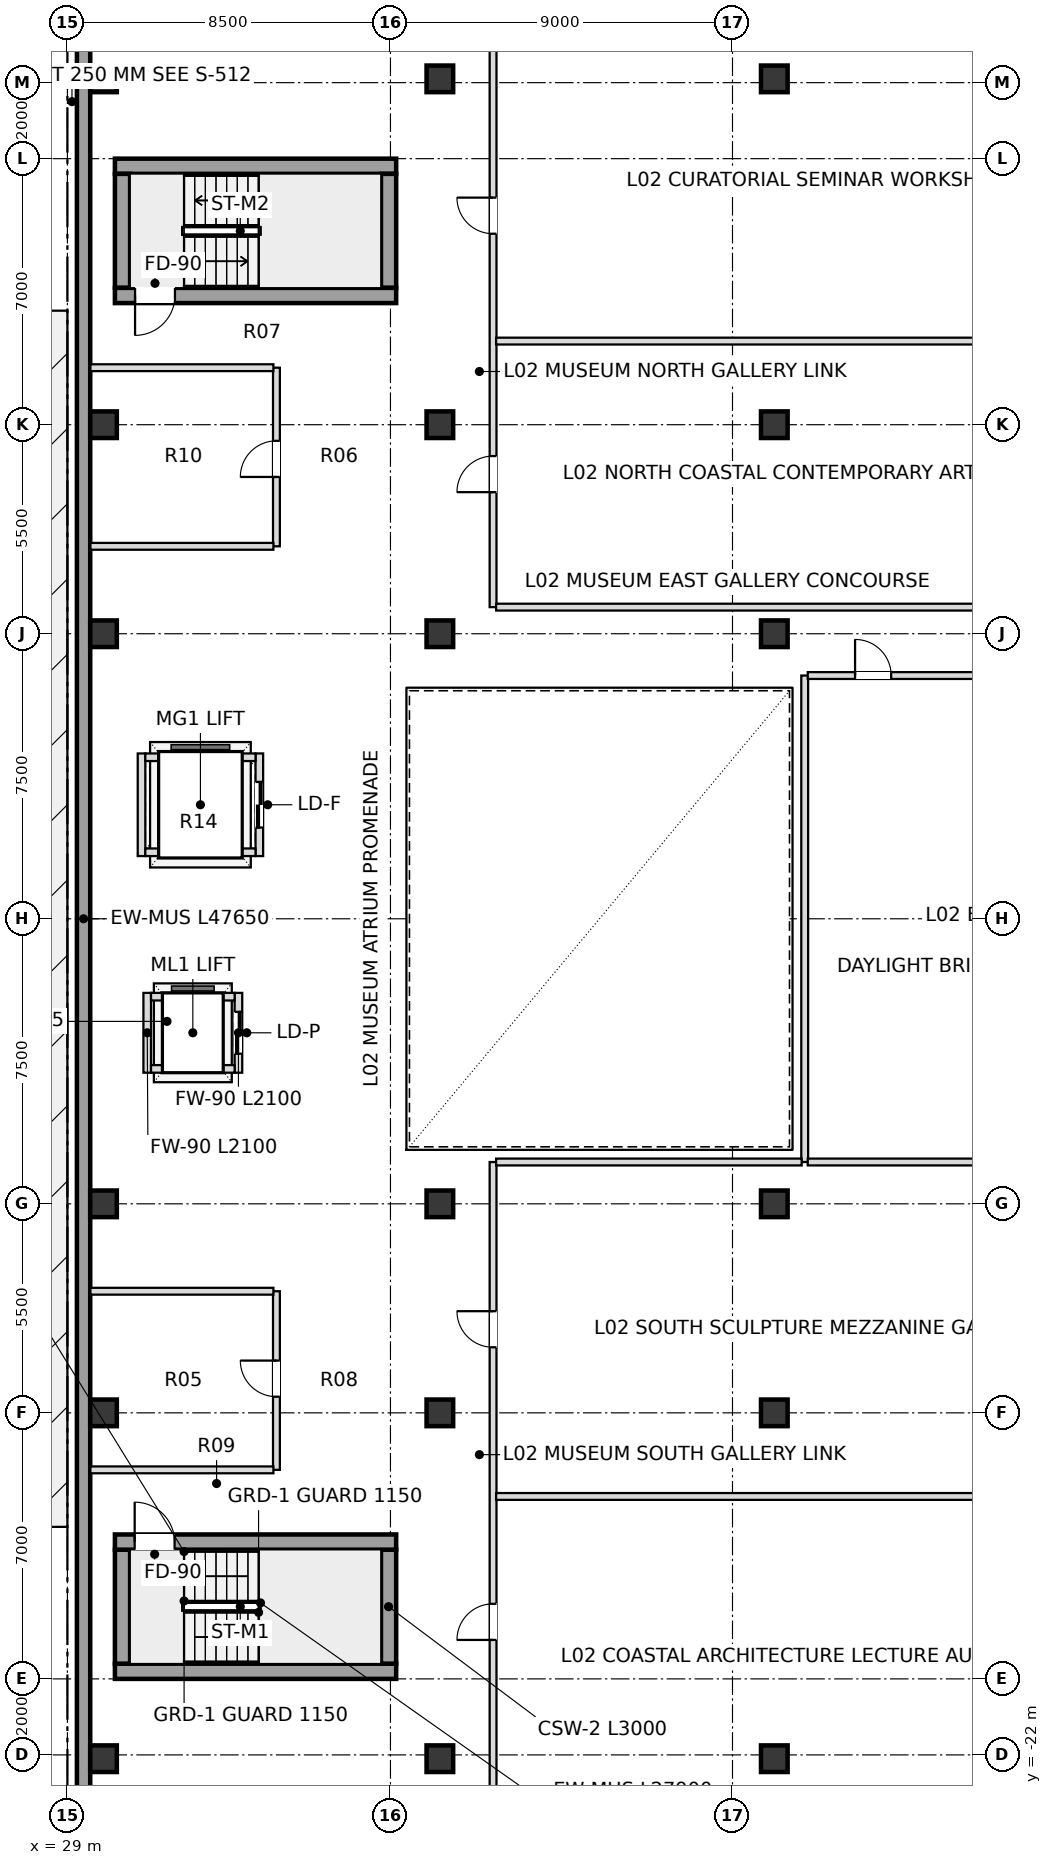
"""IFC4 building model, lengths in metres.
Left out: names, types, materials, properties, quantities, classifications, styles, units other than length and angle.
Written with IfcOpenShell. Run it as: python <this file> out.ifc"""

import sys

from ifc_helpers import new_model, si_unit, direction, frame, frame_2d, origin, origin_2d, place, context, subcontext, project, spatial, rectangle, extrude, element, fill, save


model = new_model("IFC4")
c1 = context("Model", 3, precision=1e-05, world=origin(), true_north=direction((0.0, 1.0)))
c2 = subcontext(c1, "Body", "Model", "MODEL_VIEW")
j1 = project(units=[si_unit("LENGTHUNIT", "METRE"), si_unit("PLANEANGLEUNIT", "RADIAN")], contexts=[c1])
p1 = place(None, origin())
s1 = spatial("IfcSite", under=j1, at=p1, CompositionType="ELEMENT")
p2 = place(p1, origin())
s2 = spatial("IfcBuilding", under=s1, at=p2, CompositionType="ELEMENT")
p3 = place(p2, frame((0.0, 0.0, 11.4)))
s3 = spatial("IfcBuildingStorey", under=s2, at=p3, CompositionType="ELEMENT", Elevation=11.4)
for number, where, z_axis, x_axis in (
    (1, (29.95, -22.1, 0.0), (0.0, 0.0, 1.0), (1.0, 0.0, 0.0)),
    (2, (29.95, -13.0, 0.0), (0.0, 0.0, 1.0), (1.0, 0.0, 0.0)),
    (3, (29.95, -7.5, 0.0), (0.0, 0.0, 1.0), (1.0, 0.0, 0.0)),
    (4, (29.95, 7.5, 0.0), (0.0, 0.0, 1.0), (1.0, 0.0, 0.0)),
    (5, (29.95, 13.0, 0.0), (0.0, 0.0, 1.0), (1.0, 0.0, 0.0)),
    (6, (29.95, 22.1, 0.0), (0.0, 0.0, 1.0), (1.0, 0.0, 0.0)),
    (7, (38.8, -22.1, 0.0), (0.0, 0.0, 1.0), (1.0, 0.0, 0.0)),
    (8, (38.8, -13.0, 0.0), (0.0, 0.0, 1.0), (1.0, 0.0, 0.0)),
    (9, (38.8, -7.5, 0.0), (0.0, 0.0, 1.0), (1.0, 0.0, 0.0)),
    (10, (38.8, 7.5, 0.0), (0.0, 0.0, 1.0), (1.0, 0.0, 0.0)),
    (11, (38.8, 13.0, 0.0), (0.0, 0.0, 1.0), (1.0, 0.0, 0.0)),
    (12, (38.8, 22.1, 0.0), (0.0, 0.0, 1.0), (1.0, 0.0, 0.0)),
    (13, (47.6, -22.1, 0.0), (0.0, 0.0, 1.0), (1.0, 0.0, 0.0)),
    (14, (47.6, -13.0, 0.0), (0.0, 0.0, 1.0), (1.0, 0.0, 0.0)),
    (15, (47.6, -7.5, 0.0), (0.0, 0.0, 1.0), (1.0, 0.0, 0.0)),
    (16, (47.6, 7.5, 0.0), (0.0, 0.0, 1.0), (1.0, 0.0, 0.0)),
    (17, (47.6, 13.0, 0.0), (0.0, 0.0, 1.0), (1.0, 0.0, 0.0)),
    (18, (47.6, 22.1, 0.0), (0.0, 0.0, 1.0), (1.0, 0.0, 0.0)),
):
    element("IfcColumn", number, at=place(p3, frame(where, z_axis=z_axis, x_axis=x_axis)), inside=s3, PredefinedType="COLUMN", context=c2, shape_type="SweptSolid", body=[
        extrude(rectangle(XDim=0.7, YDim=0.7, at=origin_2d()), origin(), (0.0, 0.0, 1.0), 5.4),
    ])
p4 = place(p3, frame((29.425, 23.825, 0.0), z_axis=(0.0, 0.0, 1.0), x_axis=(0.0, -1.0, 0.0)))
e19 = element("IfcWall", 19, at=p4, inside=s3, PredefinedType="SOLIDWALL", context=c2, shape_type="SweptSolid", body=[
    extrude(rectangle(XDim=47.65, YDim=0.35, at=frame_2d((23.825, 0.0))), origin(), (0.0, 0.0, 1.0), 5.08),
])
p5 = place(p3, frame((37.65, -19.8, 0.0), z_axis=(0.0, 0.0, 1.0), x_axis=(-1.0, 0.0, 0.0)))
e20 = element("IfcWall", 20, at=p5, inside=s3, PredefinedType="SHEAR", context=c2, shape_type="SweptSolid", body=[
    extrude(rectangle(XDim=7.4, YDim=0.4, at=frame_2d((3.7, 0.0))), origin(), (0.0, 0.0, 1.0), 5.08),
])
for number, where, z_axis, x_axis in (
    (21, (37.45, -19.6, 0.0), (0.0, 0.0, 1.0), (0.0, 1.0, 0.0)),
    (22, (30.45, -19.6, 0.0), (0.0, 0.0, 1.0), (0.0, 1.0, 0.0)),
):
    element("IfcWall", number, at=place(p3, frame(where, z_axis=z_axis, x_axis=x_axis)), inside=s3, PredefinedType="SHEAR", context=c2, shape_type="SweptSolid", body=[
        extrude(rectangle(XDim=3.0, YDim=0.4, at=frame_2d((1.5, 0.0))), origin(), (0.0, 0.0, 1.0), 5.08),
    ])
p6 = place(p3, frame((30.25, -16.4, 0.0), z_axis=(0.0, 0.0, 1.0), x_axis=(1.0, 0.0, 0.0)))
e23 = element("IfcWall", 23, at=p6, inside=s3, PredefinedType="SHEAR", context=c2, shape_type="SweptSolid", body=[
    extrude(rectangle(XDim=7.4, YDim=0.4, at=frame_2d((3.7, 0.0))), origin(), (0.0, 0.0, 1.0), 5.08),
])
p7 = place(p6, frame((0.52, 0.0, 0.0)))
e24 = element("IfcOpeningElement", 24, at=p7, cuts=e23, PredefinedType="OPENING", context=c2, shape_type="SweptSolid", body=[
    extrude(rectangle(XDim=1.05, YDim=2.15, at=frame_2d((0.525, 1.075))), frame((0.0, 0.21, 0.0), z_axis=(0.0, -1.0, 0.0), x_axis=(1.0, 0.0, 0.0)), (0.0, 0.0, 1.0), 0.42),
])
p8 = place(p3, frame((30.25, 19.8, 0.0), z_axis=(0.0, 0.0, 1.0), x_axis=(1.0, 0.0, 0.0)))
e25 = element("IfcWall", 25, at=p8, inside=s3, PredefinedType="SHEAR", context=c2, shape_type="SweptSolid", body=[
    extrude(rectangle(XDim=7.4, YDim=0.4, at=frame_2d((3.7, 0.0))), origin(), (0.0, 0.0, 1.0), 5.08),
])
for number, where, z_axis, x_axis in (
    (26, (37.45, 16.6, 0.0), (0.0, 0.0, 1.0), (0.0, 1.0, 0.0)),
    (27, (30.45, 16.6, 0.0), (0.0, 0.0, 1.0), (0.0, 1.0, 0.0)),
):
    element("IfcWall", number, at=place(p3, frame(where, z_axis=z_axis, x_axis=x_axis)), inside=s3, PredefinedType="SHEAR", context=c2, shape_type="SweptSolid", body=[
        extrude(rectangle(XDim=3.0, YDim=0.4, at=frame_2d((1.5, 0.0))), origin(), (0.0, 0.0, 1.0), 5.08),
    ])
p9 = place(p3, frame((37.65, 16.4, 0.0), z_axis=(0.0, 0.0, 1.0), x_axis=(-1.0, 0.0, 0.0)))
e28 = element("IfcWall", 28, at=p9, inside=s3, PredefinedType="SHEAR", context=c2, shape_type="SweptSolid", body=[
    extrude(rectangle(XDim=7.4, YDim=0.4, at=frame_2d((3.7, 0.0))), origin(), (0.0, 0.0, 1.0), 5.08),
])
p10 = place(p9, frame((5.82, 0.0, 0.0)))
e29 = element("IfcOpeningElement", 29, at=p10, cuts=e28, PredefinedType="OPENING", context=c2, shape_type="SweptSolid", body=[
    extrude(rectangle(XDim=1.05, YDim=2.15, at=frame_2d((0.525, 1.075))), frame((0.0, 0.21, 0.0), z_axis=(0.0, -1.0, 0.0), x_axis=(1.0, 0.0, 0.0)), (0.0, 0.0, 1.0), 0.42),
])
p11 = place(p3, frame((33.5, -4.05, 0.0), z_axis=(0.0, 0.0, 1.0), x_axis=(0.0, 1.0, 0.0)))
e30 = element("IfcWall", 30, at=p11, inside=s3, PredefinedType="SOLIDWALL", context=c2, shape_type="SweptSolid", body=[
    extrude(rectangle(XDim=2.1, YDim=0.2, at=frame_2d((1.05, 0.0))), origin(), (0.0, 0.0, 1.0), 4.297),
])
p12 = place(p11, frame((0.5, 0.0, 0.0)))
e31 = element("IfcOpeningElement", 31, at=p12, cuts=e30, PredefinedType="OPENING", context=c2, shape_type="SweptSolid", body=[
    extrude(rectangle(XDim=1.1, YDim=2.15, at=frame_2d((0.55, 1.075))), frame((0.0, 0.11, 0.0), z_axis=(0.0, -1.0, 0.0), x_axis=(1.0, 0.0, 0.0)), (0.0, 0.0, 1.0), 0.22),
])
p13 = place(p3, frame((31.1, -4.05, 0.0), z_axis=(0.0, 0.0, 1.0), x_axis=(0.0, 1.0, 0.0)))
e32 = element("IfcWall", 32, at=p13, inside=s3, PredefinedType="SOLIDWALL", context=c2, shape_type="SweptSolid", body=[
    extrude(rectangle(XDim=2.1, YDim=0.2, at=frame_2d((1.05, 0.0))), origin(), (0.0, 0.0, 1.0), 4.297),
])
for number, where, z_axis, x_axis in (
    (33, (31.2, -3.95, 0.0), (0.0, 0.0, 1.0), (1.0, 0.0, 0.0)),
    (34, (31.2, -2.05, 0.0), (0.0, 0.0, 1.0), (1.0, 0.0, 0.0)),
):
    element("IfcWall", number, at=place(p3, frame(where, z_axis=z_axis, x_axis=x_axis)), inside=s3, PredefinedType="SOLIDWALL", context=c2, shape_type="SweptSolid", body=[
        extrude(rectangle(XDim=2.2, YDim=0.2, at=frame_2d((1.1, 0.0))), origin(), (0.0, 0.0, 1.0), 4.297),
    ])
p14 = place(p3, frame((34.05, 1.65, 0.0), z_axis=(0.0, 0.0, 1.0), x_axis=(0.0, 1.0, 0.0)))
e35 = element("IfcWall", 35, at=p14, inside=s3, PredefinedType="SOLIDWALL", context=c2, shape_type="SweptSolid", body=[
    extrude(rectangle(XDim=2.7, YDim=0.2, at=frame_2d((1.35, 0.0))), origin(), (0.0, 0.0, 1.0), 4.297),
])
p15 = place(p14, frame((0.75, 0.0, 0.0)))
e36 = element("IfcOpeningElement", 36, at=p15, cuts=e35, PredefinedType="OPENING", context=c2, shape_type="SweptSolid", body=[
    extrude(rectangle(XDim=1.2, YDim=2.2, at=frame_2d((0.6, 1.1))), frame((0.0, 0.11, 0.0), z_axis=(0.0, -1.0, 0.0), x_axis=(1.0, 0.0, 0.0)), (0.0, 0.0, 1.0), 0.22),
])
p16 = place(p3, frame((30.95, 1.65, 0.0), z_axis=(0.0, 0.0, 1.0), x_axis=(0.0, 1.0, 0.0)))
e37 = element("IfcWall", 37, at=p16, inside=s3, PredefinedType="SOLIDWALL", context=c2, shape_type="SweptSolid", body=[
    extrude(rectangle(XDim=2.7, YDim=0.2, at=frame_2d((1.35, 0.0))), origin(), (0.0, 0.0, 1.0), 4.297),
])
for number, where, z_axis, x_axis in (
    (38, (31.05, 1.75, 0.0), (0.0, 0.0, 1.0), (1.0, 0.0, 0.0)),
    (39, (31.05, 4.25, 0.0), (0.0, 0.0, 1.0), (1.0, 0.0, 0.0)),
):
    element("IfcWall", number, at=place(p3, frame(where, z_axis=z_axis, x_axis=x_axis)), inside=s3, PredefinedType="SOLIDWALL", context=c2, shape_type="SweptSolid", body=[
        extrude(rectangle(XDim=2.9, YDim=0.2, at=frame_2d((1.45, 0.0))), origin(), (0.0, 0.0, 1.0), 4.297),
    ])
p17 = place(p3, frame((34.5, -14.5, 0.0), z_axis=(0.0, 0.0, 1.0), x_axis=(0.0, 1.0, 0.0)))
e40 = element("IfcWall", 40, at=p17, inside=s3, PredefinedType="PARTITIONING", context=c2, shape_type="SweptSolid", body=[
    extrude(rectangle(XDim=4.7, YDim=0.18, at=frame_2d((2.35, 0.0))), origin(), (0.0, 0.0, 1.0), 4.297),
])
p18 = place(p17, frame((1.925, 0.0, 0.0)))
e41 = element("IfcOpeningElement", 41, at=p18, cuts=e40, PredefinedType="OPENING", context=c2, shape_type="SweptSolid", body=[
    extrude(rectangle(XDim=0.95, YDim=2.15, at=frame_2d((0.475, 1.075))), frame((0.0, 0.1, 0.0), z_axis=(0.0, -1.0, 0.0), x_axis=(1.0, 0.0, 0.0)), (0.0, 0.0, 1.0), 0.2),
])
p19 = place(p3, frame((34.5, 9.8, 0.0), z_axis=(0.0, 0.0, 1.0), x_axis=(0.0, 1.0, 0.0)))
e42 = element("IfcWall", 42, at=p19, inside=s3, PredefinedType="PARTITIONING", context=c2, shape_type="SweptSolid", body=[
    extrude(rectangle(XDim=4.7, YDim=0.18, at=frame_2d((2.35, 0.0))), origin(), (0.0, 0.0, 1.0), 4.297),
])
p20 = place(p19, frame((1.825, 0.0, 0.0)))
e43 = element("IfcOpeningElement", 43, at=p20, cuts=e42, PredefinedType="OPENING", context=c2, shape_type="SweptSolid", body=[
    extrude(rectangle(XDim=0.95, YDim=2.15, at=frame_2d((0.475, 1.075))), frame((0.0, 0.1, 0.0), z_axis=(0.0, -1.0, 0.0), x_axis=(1.0, 0.0, 0.0)), (0.0, 0.0, 1.0), 0.2),
])
p21 = place(p3, frame((40.2, -23.645, 0.0), z_axis=(0.0, 0.0, 1.0), x_axis=(0.0, 1.0, 0.0)))
e44 = element("IfcWall", 44, at=p21, inside=s3, PredefinedType="PARTITIONING", context=c2, shape_type="SweptSolid", body=[
    extrude(rectangle(XDim=17.245, YDim=0.18, at=frame_2d((8.623, 0.0))), origin(), (0.0, 0.0, 1.0), 4.297),
])
p22 = place(p21, frame((4.67, 0.0, 0.0)))
e45 = element("IfcOpeningElement", 45, at=p22, cuts=e44, PredefinedType="OPENING", context=c2, shape_type="SweptSolid", body=[
    extrude(rectangle(XDim=0.95, YDim=2.15, at=frame_2d((0.475, 1.075))), frame((0.0, 0.1, 0.0), z_axis=(0.0, -1.0, 0.0), x_axis=(1.0, 0.0, 0.0)), (0.0, 0.0, 1.0), 0.2),
])
p23 = place(p21, frame((12.37, 0.0, 0.0)))
e46 = element("IfcOpeningElement", 46, at=p23, cuts=e44, PredefinedType="OPENING", context=c2, shape_type="SweptSolid", body=[
    extrude(rectangle(XDim=0.95, YDim=2.15, at=frame_2d((0.475, 1.075))), frame((0.0, 0.1, 0.0), z_axis=(0.0, -1.0, 0.0), x_axis=(1.0, 0.0, 0.0)), (0.0, 0.0, 1.0), 0.2),
])
p24 = place(p3, frame((40.2, 8.2, 0.0), z_axis=(0.0, 0.0, 1.0), x_axis=(0.0, 1.0, 0.0)))
e47 = element("IfcWall", 47, at=p24, inside=s3, PredefinedType="PARTITIONING", context=c2, shape_type="SweptSolid", body=[
    extrude(rectangle(XDim=15.52, YDim=0.18, at=frame_2d((7.76, 0.0))), origin(), (0.0, 0.0, 1.0), 4.297),
])
p25 = place(p24, frame((3.025, 0.0, 0.0)))
e48 = element("IfcOpeningElement", 48, at=p25, cuts=e47, PredefinedType="OPENING", context=c2, shape_type="SweptSolid", body=[
    extrude(rectangle(XDim=0.95, YDim=2.15, at=frame_2d((0.475, 1.075))), frame((0.0, 0.1, 0.0), z_axis=(0.0, -1.0, 0.0), x_axis=(1.0, 0.0, 0.0)), (0.0, 0.0, 1.0), 0.2),
])
p26 = place(p24, frame((9.825, 0.0, 0.0)))
e49 = element("IfcOpeningElement", 49, at=p26, cuts=e47, PredefinedType="OPENING", context=c2, shape_type="SweptSolid", body=[
    extrude(rectangle(XDim=0.95, YDim=2.15, at=frame_2d((0.475, 1.075))), frame((0.0, 0.1, 0.0), z_axis=(0.0, -1.0, 0.0), x_axis=(1.0, 0.0, 0.0)), (0.0, 0.0, 1.0), 0.2),
])
p27 = place(p3, frame((48.4, -6.4, 0.0), z_axis=(0.0, 0.0, 1.0), x_axis=(0.0, 1.0, 0.0)))
e50 = element("IfcWall", 50, at=p27, inside=s3, PredefinedType="PARTITIONING", context=c2, shape_type="SweptSolid", body=[
    extrude(rectangle(XDim=12.8, YDim=0.18, at=frame_2d((6.4, 0.0))), origin(), (0.0, 0.0, 1.0), 5.08),
])
p28 = place(p3, frame((40.28, -15.2, 0.0), z_axis=(0.0, 0.0, 1.0), x_axis=(1.0, 0.0, 0.0)))
e51 = element("IfcWall", 51, at=p28, inside=s3, PredefinedType="PARTITIONING", context=c2, shape_type="SweptSolid", body=[
    extrude(rectangle(XDim=16.865, YDim=0.18, at=frame_2d((8.433, 0.0))), origin(), (0.0, 0.0, 1.0), 4.214),
])
p29 = place(p3, frame((29.605, -14.5, 0.0), z_axis=(0.0, 0.0, 1.0), x_axis=(1.0, 0.0, 0.0)))
e52 = element("IfcWall", 52, at=p29, inside=s3, PredefinedType="PARTITIONING", context=c2, shape_type="SweptSolid", body=[
    extrude(rectangle(XDim=4.815, YDim=0.18, at=frame_2d((2.407, 0.0))), origin(), (0.0, 0.0, 1.0), 4.214),
])
p30 = place(p3, frame((29.605, -9.8, 0.0), z_axis=(0.0, 0.0, 1.0), x_axis=(1.0, 0.0, 0.0)))
e53 = element("IfcWall", 53, at=p30, inside=s3, PredefinedType="PARTITIONING", context=c2, shape_type="SweptSolid", body=[
    extrude(rectangle(XDim=4.815, YDim=0.18, at=frame_2d((2.407, 0.0))), origin(), (0.0, 0.0, 1.0), 4.297),
])
p31 = place(p3, frame((40.28, -6.4, 0.0), z_axis=(0.0, 0.0, 1.0), x_axis=(1.0, 0.0, 0.0)))
e54 = element("IfcWall", 54, at=p31, inside=s3, PredefinedType="PARTITIONING", context=c2, shape_type="SweptSolid", body=[
    extrude(rectangle(XDim=8.04, YDim=0.18, at=frame_2d((4.02, 0.0))), origin(), (0.0, 0.0, 1.0), 4.297),
])
p32 = place(p3, frame((48.48, -6.4, 0.0), z_axis=(0.0, 0.0, 1.0), x_axis=(1.0, 0.0, 0.0)))
e55 = element("IfcWall", 55, at=p32, inside=s3, PredefinedType="PARTITIONING", context=c2, shape_type="SweptSolid", body=[
    extrude(rectangle(XDim=8.665, YDim=0.18, at=frame_2d((4.333, 0.0))), origin(), (0.0, 0.0, 1.0), 4.297),
])
p33 = place(p3, frame((48.48, 6.4, 0.0), z_axis=(0.0, 0.0, 1.0), x_axis=(1.0, 0.0, 0.0)))
e56 = element("IfcWall", 56, at=p33, inside=s3, PredefinedType="PARTITIONING", context=c2, shape_type="SweptSolid", body=[
    extrude(rectangle(XDim=8.665, YDim=0.18, at=frame_2d((4.333, 0.0))), origin(), (0.0, 0.0, 1.0), 4.297),
])
p34 = place(p33, frame((1.245, 0.0, 0.0)))
e57 = element("IfcOpeningElement", 57, at=p34, cuts=e56, PredefinedType="OPENING", context=c2, shape_type="SweptSolid", body=[
    extrude(rectangle(XDim=0.95, YDim=2.15, at=frame_2d((0.475, 1.075))), frame((0.0, 0.1, 0.0), z_axis=(0.0, -1.0, 0.0), x_axis=(1.0, 0.0, 0.0)), (0.0, 0.0, 1.0), 0.2),
])
p35 = place(p3, frame((40.28, 8.2, 0.0), z_axis=(0.0, 0.0, 1.0), x_axis=(1.0, 0.0, 0.0)))
e58 = element("IfcWall", 58, at=p35, inside=s3, PredefinedType="PARTITIONING", context=c2, shape_type="SweptSolid", body=[
    extrude(rectangle(XDim=16.865, YDim=0.18, at=frame_2d((8.433, 0.0))), origin(), (0.0, 0.0, 1.0), 4.297),
])
for number, where, z_axis, x_axis in (
    (59, (29.605, 9.8, 0.0), (0.0, 0.0, 1.0), (1.0, 0.0, 0.0)),
    (60, (29.605, 14.5, 0.0), (0.0, 0.0, 1.0), (1.0, 0.0, 0.0)),
):
    element("IfcWall", number, at=place(p3, frame(where, z_axis=z_axis, x_axis=x_axis)), inside=s3, PredefinedType="PARTITIONING", context=c2, shape_type="SweptSolid", body=[
        extrude(rectangle(XDim=4.815, YDim=0.18, at=frame_2d((2.407, 0.0))), origin(), (0.0, 0.0, 1.0), 4.297),
    ])
p36 = place(p3, frame((40.28, 15.2, 0.0), z_axis=(0.0, 0.0, 1.0), x_axis=(1.0, 0.0, 0.0)))
e61 = element("IfcWall", 61, at=p36, inside=s3, PredefinedType="PARTITIONING", context=c2, shape_type="SweptSolid", body=[
    extrude(rectangle(XDim=16.865, YDim=0.18, at=frame_2d((8.433, 0.0))), origin(), (0.0, 0.0, 1.0), 4.297),
])
p37 = place(p7, origin())
e62 = element("IfcDoor", 62, at=p37, inside=s3, OperationType="SINGLE_SWING_LEFT", PredefinedType="DOOR", context=c2, shape_type="SweptSolid", body=[
    extrude(rectangle(XDim=1.05, YDim=2.15, at=frame_2d((0.525, 1.075))), frame((0.0, 0.025, 0.0), z_axis=(0.0, -1.0, 0.0), x_axis=(1.0, 0.0, 0.0)), (0.0, 0.0, 1.0), 0.05),
])
fill(e24, e62)
p38 = place(p10, origin())
e63 = element("IfcDoor", 63, at=p38, inside=s3, OperationType="SINGLE_SWING_RIGHT", PredefinedType="DOOR", context=c2, shape_type="SweptSolid", body=[
    extrude(rectangle(XDim=1.05, YDim=2.15, at=frame_2d((0.525, 1.075))), frame((0.0, 0.025, 0.0), z_axis=(0.0, -1.0, 0.0), x_axis=(1.0, 0.0, 0.0)), (0.0, 0.0, 1.0), 0.05),
])
fill(e29, e63)
p39 = place(p12, origin())
e64 = element("IfcDoor", 64, at=p39, inside=s3, OperationType="DOUBLE_DOOR_SLIDING", PredefinedType="DOOR", context=c2, shape_type="SweptSolid", body=[
    extrude(rectangle(XDim=1.1, YDim=2.15, at=frame_2d((0.55, 1.075))), frame((0.0, 0.025, 0.0), z_axis=(0.0, -1.0, 0.0), x_axis=(1.0, 0.0, 0.0)), (0.0, 0.0, 1.0), 0.05),
])
fill(e31, e64)
p40 = place(p15, origin())
e65 = element("IfcDoor", 65, at=p40, inside=s3, OperationType="DOUBLE_DOOR_SLIDING", PredefinedType="DOOR", context=c2, shape_type="SweptSolid", body=[
    extrude(rectangle(XDim=1.2, YDim=2.2, at=frame_2d((0.6, 1.1))), frame((0.0, 0.025, 0.0), z_axis=(0.0, -1.0, 0.0), x_axis=(1.0, 0.0, 0.0)), (0.0, 0.0, 1.0), 0.05),
])
fill(e36, e65)
p41 = place(p25, origin())
e66 = element("IfcDoor", 66, at=p41, inside=s3, OperationType="SINGLE_SWING_LEFT", PredefinedType="DOOR", context=c2, shape_type="SweptSolid", body=[
    extrude(rectangle(XDim=0.95, YDim=2.15, at=frame_2d((0.475, 1.075))), frame((0.0, 0.025, 0.0), z_axis=(0.0, -1.0, 0.0), x_axis=(1.0, 0.0, 0.0)), (0.0, 0.0, 1.0), 0.05),
])
fill(e48, e66)
p42 = place(p26, origin())
e67 = element("IfcDoor", 67, at=p42, inside=s3, OperationType="SINGLE_SWING_RIGHT", PredefinedType="DOOR", context=c2, shape_type="SweptSolid", body=[
    extrude(rectangle(XDim=0.95, YDim=2.15, at=frame_2d((0.475, 1.075))), frame((0.0, 0.025, 0.0), z_axis=(0.0, -1.0, 0.0), x_axis=(1.0, 0.0, 0.0)), (0.0, 0.0, 1.0), 0.05),
])
fill(e49, e67)
p43 = place(p20, origin())
e68 = element("IfcDoor", 68, at=p43, inside=s3, OperationType="SINGLE_SWING_LEFT", PredefinedType="DOOR", context=c2, shape_type="SweptSolid", body=[
    extrude(rectangle(XDim=0.95, YDim=2.15, at=frame_2d((0.475, 1.075))), frame((0.0, 0.025, 0.0), z_axis=(0.0, -1.0, 0.0), x_axis=(1.0, 0.0, 0.0)), (0.0, 0.0, 1.0), 0.05),
])
fill(e43, e68)
p44 = place(p18, origin())
e69 = element("IfcDoor", 69, at=p44, inside=s3, OperationType="SINGLE_SWING_RIGHT", PredefinedType="DOOR", context=c2, shape_type="SweptSolid", body=[
    extrude(rectangle(XDim=0.95, YDim=2.15, at=frame_2d((0.475, 1.075))), frame((0.0, 0.025, 0.0), z_axis=(0.0, -1.0, 0.0), x_axis=(1.0, 0.0, 0.0)), (0.0, 0.0, 1.0), 0.05),
])
fill(e41, e69)
p45 = place(p22, origin())
e70 = element("IfcDoor", 70, at=p45, inside=s3, OperationType="SINGLE_SWING_LEFT", PredefinedType="DOOR", context=c2, shape_type="SweptSolid", body=[
    extrude(rectangle(XDim=0.95, YDim=2.15, at=frame_2d((0.475, 1.075))), frame((0.0, 0.025, 0.0), z_axis=(0.0, -1.0, 0.0), x_axis=(1.0, 0.0, 0.0)), (0.0, 0.0, 1.0), 0.05),
])
fill(e45, e70)
p46 = place(p23, origin())
e71 = element("IfcDoor", 71, at=p46, inside=s3, OperationType="SINGLE_SWING_RIGHT", PredefinedType="DOOR", context=c2, shape_type="SweptSolid", body=[
    extrude(rectangle(XDim=0.95, YDim=2.15, at=frame_2d((0.475, 1.075))), frame((0.0, 0.025, 0.0), z_axis=(0.0, -1.0, 0.0), x_axis=(1.0, 0.0, 0.0)), (0.0, 0.0, 1.0), 0.05),
])
fill(e46, e71)
p47 = place(p34, origin())
e72 = element("IfcDoor", 72, at=p47, inside=s3, OperationType="SINGLE_SWING_LEFT", PredefinedType="DOOR", context=c2, shape_type="SweptSolid", body=[
    extrude(rectangle(XDim=0.95, YDim=2.15, at=frame_2d((0.475, 1.075))), frame((0.0, 0.025, 0.0), z_axis=(0.0, -1.0, 0.0), x_axis=(1.0, 0.0, 0.0)), (0.0, 0.0, 1.0), 0.05),
])
fill(e57, e72)
save(model, sys.argv[1])
